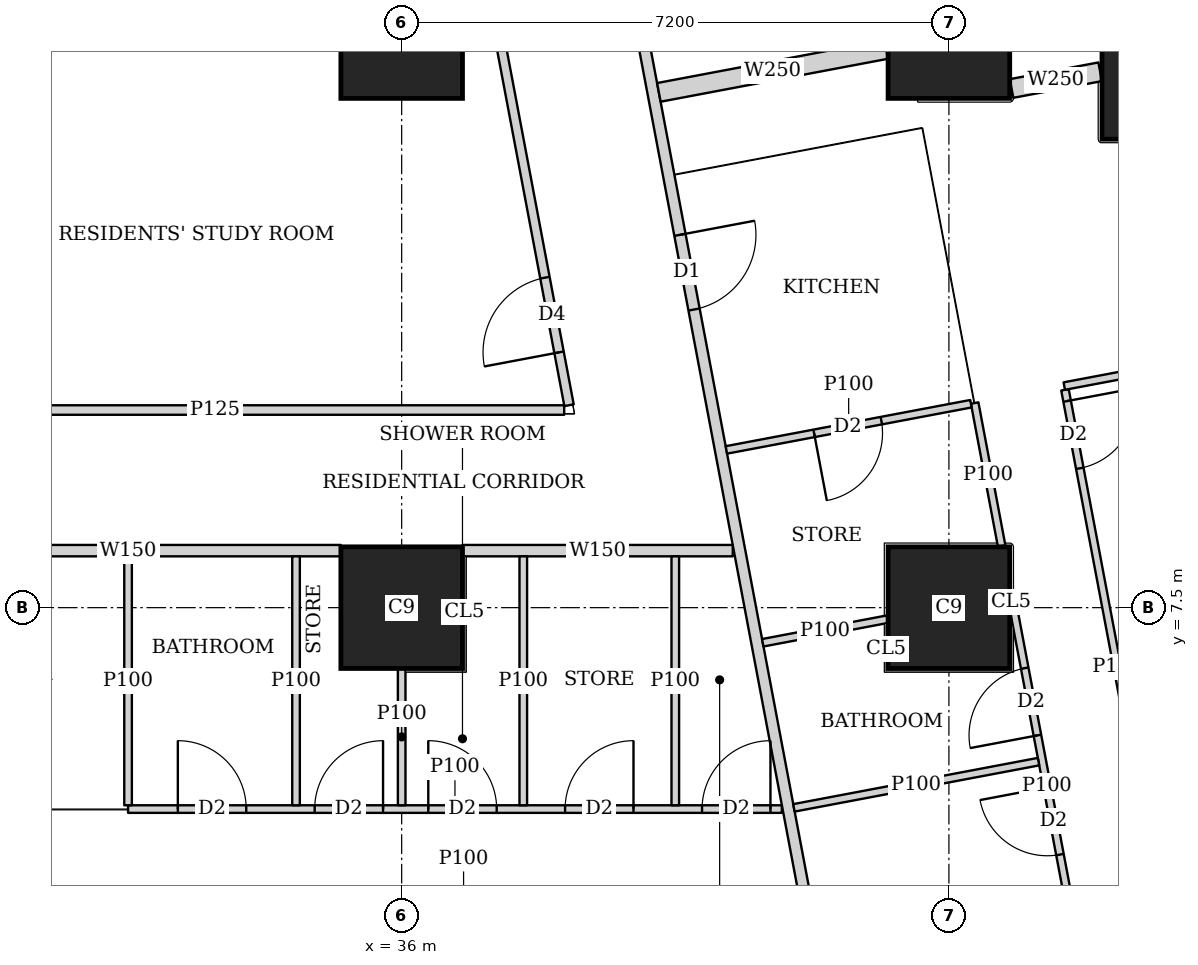
"""IFC4 building model, lengths in metres.
Left out: names, types, materials, properties, quantities, classifications, styles, units other than length and angle.
Written with IfcOpenShell. Run it as: python <this file> out.ifc"""

import sys

from ifc_helpers import new_model, si_unit, direction, frame, frame_2d, origin, origin_2d, place, context, subcontext, project, spatial, rectangle, extrude, element, fill, save


model = new_model("IFC4")
c1 = context("Model", 3, precision=1e-05, world=origin(), true_north=direction((0.0, 1.0)))
c2 = subcontext(c1, "Body", "Model", "MODEL_VIEW")
j1 = project(units=[si_unit("LENGTHUNIT", "METRE"), si_unit("PLANEANGLEUNIT", "RADIAN")], contexts=[c1])
p1 = place(None, origin())
s1 = spatial("IfcSite", under=j1, at=p1, CompositionType="ELEMENT")
p2 = place(p1, origin())
s2 = spatial("IfcBuilding", under=s1, at=p2, CompositionType="ELEMENT")
p3 = place(p2, frame((0.0, 0.0, 81.65)))
s3 = spatial("IfcBuildingStorey", under=s2, at=p3, CompositionType="ELEMENT", Elevation=81.65)
for number, where, z_axis, x_axis in (
    (1, (36.0, 7.5, 0.0), (0.0, 0.0, 1.0), (1.0, 0.0, 0.0)),
    (2, (43.2, 7.5, 0.0), (0.0, 0.0, 1.0), (1.0, 0.0, 0.0)),
    (3, (36.0, 15.0, 0.0), (0.0, 0.0, 1.0), (1.0, 0.0, 0.0)),
    (4, (43.2, 15.0, 0.0), (0.0, 0.0, 1.0), (1.0, 0.0, 0.0)),
):
    element("IfcColumn", number, at=place(p3, frame(where, z_axis=z_axis, x_axis=x_axis)), inside=s3, PredefinedType="COLUMN", context=c2, shape_type="SweptSolid", body=[
        extrude(rectangle(XDim=1.6, YDim=1.6, at=origin_2d()), origin(), (0.0, 0.0, 1.0), 3.75),
    ])
p4 = place(p3, frame((46.314, 14.763, 0.0), z_axis=(0.0, 0.0, 1.0), x_axis=(1.0, 0.0, 0.0)))
e5 = element("IfcColumn", 5, at=p4, inside=s3, PredefinedType="COLUMN", context=c2, shape_type="SweptSolid", body=[
    extrude(rectangle(XDim=2.2, YDim=2.2, at=origin_2d()), origin(), (0.0, 0.0, 1.0), 3.75),
])
p5 = place(p3, frame((50.653, 2.703, 0.0), z_axis=(0.0, 0.0, 1.0), x_axis=(-0.185612026696, 0.982623109613, 0.0)))
e6 = element("IfcWall", 6, at=p5, inside=s3, PredefinedType="SOLIDWALL", context=c2, shape_type="SweptSolid", body=[
    extrude(rectangle(XDim=41.393, YDim=0.2, at=frame_2d((20.697, 0.0))), origin(), (0.0, 0.0, 1.0), 3.5),
])
p6 = place(p5, frame((1.633, 0.0, 0.9)))
e7 = element("IfcOpeningElement", 7, at=p6, cuts=e6, PredefinedType="OPENING", context=c2, shape_type="SweptSolid", body=[
    extrude(rectangle(XDim=1.8, YDim=1.5, at=frame_2d((0.9, 0.75))), frame((0.0, 0.11, 0.0), z_axis=(0.0, -1.0, 0.0), x_axis=(1.0, 0.0, 0.0)), (0.0, 0.0, 1.0), 0.22),
])
p7 = place(p5, frame((6.032, 0.0, 0.9)))
e8 = element("IfcOpeningElement", 8, at=p7, cuts=e6, PredefinedType="OPENING", context=c2, shape_type="SweptSolid", body=[
    extrude(rectangle(XDim=1.8, YDim=1.5, at=frame_2d((0.9, 0.75))), frame((0.0, 0.11, 0.0), z_axis=(0.0, -1.0, 0.0), x_axis=(1.0, 0.0, 0.0)), (0.0, 0.0, 1.0), 0.22),
])
p8 = place(p5, frame((9.848, 0.0, 0.9)))
e9 = element("IfcOpeningElement", 9, at=p8, cuts=e6, PredefinedType="OPENING", context=c2, shape_type="SweptSolid", body=[
    extrude(rectangle(XDim=1.8, YDim=1.5, at=frame_2d((0.9, 0.75))), frame((0.0, 0.11, 0.0), z_axis=(0.0, -1.0, 0.0), x_axis=(1.0, 0.0, 0.0)), (0.0, 0.0, 1.0), 0.22),
])
p9 = place(p5, frame((13.664, 0.0, 0.9)))
e10 = element("IfcOpeningElement", 10, at=p9, cuts=e6, PredefinedType="OPENING", context=c2, shape_type="SweptSolid", body=[
    extrude(rectangle(XDim=1.8, YDim=1.5, at=frame_2d((0.9, 0.75))), frame((0.0, 0.11, 0.0), z_axis=(0.0, -1.0, 0.0), x_axis=(1.0, 0.0, 0.0)), (0.0, 0.0, 1.0), 0.22),
])
p10 = place(p5, frame((17.481, 0.0, 0.9)))
e11 = element("IfcOpeningElement", 11, at=p10, cuts=e6, PredefinedType="OPENING", context=c2, shape_type="SweptSolid", body=[
    extrude(rectangle(XDim=1.8, YDim=1.5, at=frame_2d((0.9, 0.75))), frame((0.0, 0.11, 0.0), z_axis=(0.0, -1.0, 0.0), x_axis=(1.0, 0.0, 0.0)), (0.0, 0.0, 1.0), 0.22),
])
p11 = place(p5, frame((21.297, 0.0, 0.9)))
e12 = element("IfcOpeningElement", 12, at=p11, cuts=e6, PredefinedType="OPENING", context=c2, shape_type="SweptSolid", body=[
    extrude(rectangle(XDim=1.8, YDim=1.5, at=frame_2d((0.9, 0.75))), frame((0.0, 0.11, 0.0), z_axis=(0.0, -1.0, 0.0), x_axis=(1.0, 0.0, 0.0)), (0.0, 0.0, 1.0), 0.22),
])
p12 = place(p5, frame((25.113, 0.0, 0.9)))
e13 = element("IfcOpeningElement", 13, at=p12, cuts=e6, PredefinedType="OPENING", context=c2, shape_type="SweptSolid", body=[
    extrude(rectangle(XDim=1.8, YDim=1.5, at=frame_2d((0.9, 0.75))), frame((0.0, 0.11, 0.0), z_axis=(0.0, -1.0, 0.0), x_axis=(1.0, 0.0, 0.0)), (0.0, 0.0, 1.0), 0.22),
])
p13 = place(p5, frame((28.93, 0.0, 0.9)))
e14 = element("IfcOpeningElement", 14, at=p13, cuts=e6, PredefinedType="OPENING", context=c2, shape_type="SweptSolid", body=[
    extrude(rectangle(XDim=1.8, YDim=1.5, at=frame_2d((0.9, 0.75))), frame((0.0, 0.11, 0.0), z_axis=(0.0, -1.0, 0.0), x_axis=(1.0, 0.0, 0.0)), (0.0, 0.0, 1.0), 0.22),
])
p14 = place(p5, frame((32.746, 0.0, 0.9)))
e15 = element("IfcOpeningElement", 15, at=p14, cuts=e6, PredefinedType="OPENING", context=c2, shape_type="SweptSolid", body=[
    extrude(rectangle(XDim=1.8, YDim=1.5, at=frame_2d((0.9, 0.75))), frame((0.0, 0.11, 0.0), z_axis=(0.0, -1.0, 0.0), x_axis=(1.0, 0.0, 0.0)), (0.0, 0.0, 1.0), 0.22),
])
p15 = place(p5, frame((36.481, 0.0, 0.9)))
e16 = element("IfcOpeningElement", 16, at=p15, cuts=e6, PredefinedType="OPENING", context=c2, shape_type="SweptSolid", body=[
    extrude(rectangle(XDim=1.8, YDim=1.5, at=frame_2d((0.9, 0.75))), frame((0.0, 0.11, 0.0), z_axis=(0.0, -1.0, 0.0), x_axis=(1.0, 0.0, 0.0)), (0.0, 0.0, 1.0), 0.22),
])
p16 = place(p3, frame((40.356, 8.25, 0.0), z_axis=(0.0, 0.0, 1.0), x_axis=(-1.0, 0.0, 0.0)))
e17 = element("IfcWall", 17, at=p16, inside=s3, PredefinedType="SOLIDWALL", context=c2, shape_type="SweptSolid", body=[
    extrude(rectangle(XDim=3.555, YDim=0.15, at=frame_2d((1.777, 0.0))), origin(), (0.0, 0.0, 1.0), 3.5),
])
p17 = place(p3, frame((35.199, 8.25, 0.0), z_axis=(0.0, 0.0, 1.0), x_axis=(-1.0, 0.0, 0.0)))
e18 = element("IfcWall", 18, at=p17, inside=s3, PredefinedType="SOLIDWALL", context=c2, shape_type="SweptSolid", body=[
    extrude(rectangle(XDim=5.598, YDim=0.15, at=frame_2d((2.799, 0.0))), origin(), (0.0, 0.0, 1.0), 3.5),
])
p18 = place(p17, frame((3.899, 0.0, 0.0)))
e19 = element("IfcOpeningElement", 19, at=p18, cuts=e18, PredefinedType="OPENING", context=c2, shape_type="SweptSolid", body=[
    extrude(rectangle(XDim=1.0, YDim=2.1, at=frame_2d((0.5, 1.05))), frame((0.0, 0.085, 0.0), z_axis=(0.0, -1.0, 0.0), x_axis=(1.0, 0.0, 0.0)), (0.0, 0.0, 1.0), 0.17),
])
p19 = place(p3, frame((33.382, 45.65, 0.0), z_axis=(0.0, 0.0, 1.0), x_axis=(0.185593544777, -0.982626600565, 0.0)))
e20 = element("IfcWall", 20, at=p19, inside=s3, PredefinedType="SOLIDWALL", context=c2, shape_type="SweptSolid", body=[
    extrude(rectangle(XDim=47.118, YDim=0.15, at=frame_2d((23.559, 0.0))), origin(), (0.0, 0.0, 1.0), 2.2),
])
p20 = place(p19, frame((19.054, 0.0, 0.0)))
e21 = element("IfcOpeningElement", 21, at=p20, cuts=e20, PredefinedType="OPENING", context=c2, shape_type="SweptSolid", body=[
    extrude(rectangle(XDim=1.0, YDim=2.1, at=frame_2d((0.5, 1.05))), frame((0.0, 0.085, 0.0), z_axis=(0.0, -1.0, 0.0), x_axis=(1.0, 0.0, 0.0)), (0.0, 0.0, 1.0), 0.17),
])
p21 = place(p19, frame((22.87, 0.0, 0.0)))
e22 = element("IfcOpeningElement", 22, at=p21, cuts=e20, PredefinedType="OPENING", context=c2, shape_type="SweptSolid", body=[
    extrude(rectangle(XDim=1.0, YDim=2.1, at=frame_2d((0.5, 1.05))), frame((0.0, 0.085, 0.0), z_axis=(0.0, -1.0, 0.0), x_axis=(1.0, 0.0, 0.0)), (0.0, 0.0, 1.0), 0.17),
])
p22 = place(p19, frame((33.833, 0.0, 0.0)))
e23 = element("IfcOpeningElement", 23, at=p22, cuts=e20, PredefinedType="OPENING", context=c2, shape_type="SweptSolid", body=[
    extrude(rectangle(XDim=1.0, YDim=2.1, at=frame_2d((0.5, 1.05))), frame((0.0, 0.085, 0.0), z_axis=(0.0, -1.0, 0.0), x_axis=(1.0, 0.0, 0.0)), (0.0, 0.0, 1.0), 0.17),
])
p23 = place(p3, frame((41.002, 4.85, 0.0), z_axis=(0.0, 0.0, 1.0), x_axis=(-1.0, 0.0, 0.0)))
e24 = element("IfcWall", 24, at=p23, inside=s3, PredefinedType="PARTITIONING", context=c2, shape_type="SweptSolid", body=[
    extrude(rectangle(XDim=8.602, YDim=0.1, at=frame_2d((4.301, 0.0))), origin(), (0.0, 0.0, 1.0), 3.5),
])
p24 = place(p23, frame((7.047, 0.0, 0.0)))
e25 = element("IfcOpeningElement", 25, at=p24, cuts=e24, PredefinedType="OPENING", context=c2, shape_type="SweptSolid", body=[
    extrude(rectangle(XDim=0.9, YDim=2.1, at=frame_2d((0.45, 1.05))), frame((0.0, 0.06, 0.0), z_axis=(0.0, -1.0, 0.0), x_axis=(1.0, 0.0, 0.0)), (0.0, 0.0, 1.0), 0.12),
])
p25 = place(p23, frame((3.752, 0.0, 0.0)))
e26 = element("IfcOpeningElement", 26, at=p25, cuts=e24, PredefinedType="OPENING", context=c2, shape_type="SweptSolid", body=[
    extrude(rectangle(XDim=0.9, YDim=2.1, at=frame_2d((0.45, 1.05))), frame((0.0, 0.06, 0.0), z_axis=(0.0, -1.0, 0.0), x_axis=(1.0, 0.0, 0.0)), (0.0, 0.0, 1.0), 0.12),
])
p26 = place(p23, frame((0.15, 0.0, 0.0)))
e27 = element("IfcOpeningElement", 27, at=p26, cuts=e24, PredefinedType="OPENING", context=c2, shape_type="SweptSolid", body=[
    extrude(rectangle(XDim=0.9, YDim=2.1, at=frame_2d((0.45, 1.05))), frame((0.0, 0.06, 0.0), z_axis=(0.0, -1.0, 0.0), x_axis=(1.0, 0.0, 0.0)), (0.0, 0.0, 1.0), 0.12),
])
p27 = place(p23, frame((5.247, 0.0, 0.0)))
e28 = element("IfcOpeningElement", 28, at=p27, cuts=e24, PredefinedType="OPENING", context=c2, shape_type="SweptSolid", body=[
    extrude(rectangle(XDim=0.9, YDim=2.1, at=frame_2d((0.45, 1.05))), frame((0.0, 0.06, 0.0), z_axis=(0.0, -1.0, 0.0), x_axis=(1.0, 0.0, 0.0)), (0.0, 0.0, 1.0), 0.12),
])
p28 = place(p23, frame((1.952, 0.0, 0.0)))
e29 = element("IfcOpeningElement", 29, at=p28, cuts=e24, PredefinedType="OPENING", context=c2, shape_type="SweptSolid", body=[
    extrude(rectangle(XDim=0.9, YDim=2.1, at=frame_2d((0.45, 1.05))), frame((0.0, 0.06, 0.0), z_axis=(0.0, -1.0, 0.0), x_axis=(1.0, 0.0, 0.0)), (0.0, 0.0, 1.0), 0.12),
])
p29 = place(p3, frame((32.4, 4.9, 0.0), z_axis=(0.0, 0.0, 1.0), x_axis=(0.0, 1.0, 0.0)))
e30 = element("IfcWall", 30, at=p29, inside=s3, PredefinedType="PARTITIONING", context=c2, shape_type="SweptSolid", body=[
    extrude(rectangle(XDim=3.275, YDim=0.1, at=frame_2d((1.638, 0.0))), origin(), (0.0, 0.0, 1.0), 3.5),
])
p30 = place(p3, frame((36.0, 4.9, 0.0), z_axis=(0.0, 0.0, 1.0), x_axis=(0.0, 1.0, 0.0)))
e31 = element("IfcWall", 31, at=p30, inside=s3, PredefinedType="PARTITIONING", context=c2, shape_type="SweptSolid", body=[
    extrude(rectangle(XDim=1.799, YDim=0.1, at=frame_2d((0.899, 0.0))), origin(), (0.0, 0.0, 1.0), 3.5),
])
for number, where, z_axis, x_axis in (
    (32, (39.6, 4.9, 0.0), (0.0, 0.0, 1.0), (0.0, 1.0, 0.0)),
    (33, (34.61, 4.9, 0.0), (0.0, 0.0, 1.0), (0.0, 1.0, 0.0)),
    (34, (37.6, 4.9, 0.0), (0.0, 0.0, 1.0), (0.0, 1.0, 0.0)),
):
    element("IfcWall", number, at=place(p3, frame(where, z_axis=z_axis, x_axis=x_axis)), inside=s3, PredefinedType="PARTITIONING", context=c2, shape_type="SweptSolid", body=[
        extrude(rectangle(XDim=3.275, YDim=0.1, at=frame_2d((1.638, 0.0))), origin(), (0.0, 0.0, 1.0), 3.5),
    ])
p31 = place(p3, frame((44.727, 10.366, 0.0), z_axis=(0.0, 0.0, 1.0), x_axis=(0.185678775129, -0.982610498858, 0.0)))
e35 = element("IfcWall", 35, at=p31, inside=s3, PredefinedType="PARTITIONING", context=c2, shape_type="SweptSolid", body=[
    extrude(rectangle(XDim=7.421, YDim=0.1, at=frame_2d((3.71, 0.0))), origin(), (0.0, 0.0, 1.0), 3.5),
])
p32 = place(p31, frame((0.151, 0.0, 0.0)))
e36 = element("IfcOpeningElement", 36, at=p32, cuts=e35, PredefinedType="OPENING", context=c2, shape_type="SweptSolid", body=[
    extrude(rectangle(XDim=0.9, YDim=2.1, at=frame_2d((0.45, 1.05))), frame((0.0, 0.06, 0.0), z_axis=(0.0, -1.0, 0.0), x_axis=(1.0, 0.0, 0.0)), (0.0, 0.0, 1.0), 0.12),
])
p33 = place(p31, frame((4.55, 0.0, 0.0)))
e37 = element("IfcOpeningElement", 37, at=p33, cuts=e35, PredefinedType="OPENING", context=c2, shape_type="SweptSolid", body=[
    extrude(rectangle(XDim=0.9, YDim=2.1, at=frame_2d((0.45, 1.05))), frame((0.0, 0.06, 0.0), z_axis=(0.0, -1.0, 0.0), x_axis=(1.0, 0.0, 0.0)), (0.0, 0.0, 1.0), 0.12),
])
p34 = place(p3, frame((43.539, 10.192, 0.0), z_axis=(0.0, 0.0, 1.0), x_axis=(0.185366049966, -0.982669541362, 0.0)))
e38 = element("IfcWall", 38, at=p34, inside=s3, PredefinedType="PARTITIONING", context=c2, shape_type="SweptSolid", body=[
    extrude(rectangle(XDim=1.915, YDim=0.1, at=frame_2d((0.958, 0.0))), origin(), (0.0, 0.0, 1.0), 3.5),
])
p35 = place(p3, frame((44.049, 7.49, 0.0), z_axis=(0.0, 0.0, 1.0), x_axis=(0.185666332607, -0.982612849975, 0.0)))
e39 = element("IfcWall", 39, at=p35, inside=s3, PredefinedType="PARTITIONING", context=c2, shape_type="SweptSolid", body=[
    extrude(rectangle(XDim=4.75, YDim=0.1, at=frame_2d((2.375, 0.0))), origin(), (0.0, 0.0, 1.0), 3.5),
])
p36 = place(p35, frame((0.8, 0.0, 0.0)))
e40 = element("IfcOpeningElement", 40, at=p36, cuts=e39, PredefinedType="OPENING", context=c2, shape_type="SweptSolid", body=[
    extrude(rectangle(XDim=0.9, YDim=2.1, at=frame_2d((0.45, 1.05))), frame((0.0, 0.06, 0.0), z_axis=(0.0, -1.0, 0.0), x_axis=(1.0, 0.0, 0.0)), (0.0, 0.0, 1.0), 0.12),
])
p37 = place(p35, frame((2.396, 0.0, 0.0)))
e41 = element("IfcOpeningElement", 41, at=p37, cuts=e39, PredefinedType="OPENING", context=c2, shape_type="SweptSolid", body=[
    extrude(rectangle(XDim=0.9, YDim=2.1, at=frame_2d((0.45, 1.05))), frame((0.0, 0.06, 0.0), z_axis=(0.0, -1.0, 0.0), x_axis=(1.0, 0.0, 0.0)), (0.0, 0.0, 1.0), 0.12),
])
p38 = place(p3, frame((48.943, 11.213, 0.0), z_axis=(0.0, 0.0, 1.0), x_axis=(-0.982633535512, -0.185556823879, 0.0)))
e42 = element("IfcWall", 42, at=p38, inside=s3, PredefinedType="PARTITIONING", context=c2, shape_type="SweptSolid", body=[
    extrude(rectangle(XDim=4.3, YDim=0.1, at=frame_2d((2.15, 0.0))), origin(), (0.0, 0.0, 1.0), 2.2),
])
p39 = place(p3, frame((43.49, 10.183, 0.0), z_axis=(0.0, 0.0, 1.0), x_axis=(-0.982607026909, -0.185697147715, 0.0)))
e43 = element("IfcWall", 43, at=p39, inside=s3, PredefinedType="PARTITIONING", context=c2, shape_type="SweptSolid", body=[
    extrude(rectangle(XDim=3.275, YDim=0.1, at=frame_2d((1.637, 0.0))), origin(), (0.0, 0.0, 1.0), 3.5),
])
p40 = place(p39, frame((1.2, 0.0, 0.0)))
e44 = element("IfcOpeningElement", 44, at=p40, cuts=e43, PredefinedType="OPENING", context=c2, shape_type="SweptSolid", body=[
    extrude(rectangle(XDim=0.9, YDim=2.1, at=frame_2d((0.45, 1.05))), frame((0.0, 0.06, 0.0), z_axis=(0.0, -1.0, 0.0), x_axis=(1.0, 0.0, 0.0)), (0.0, 0.0, 1.0), 0.12),
])
p41 = place(p3, frame((42.39, 7.348, 0.0), z_axis=(0.0, 0.0, 1.0), x_axis=(-0.9825976927, -0.185746532405, 0.0)))
e45 = element("IfcWall", 45, at=p41, inside=s3, PredefinedType="PARTITIONING", context=c2, shape_type="SweptSolid", body=[
    extrude(rectangle(XDim=1.668, YDim=0.1, at=frame_2d((0.834, 0.0))), origin(), (0.0, 0.0, 1.0), 3.5),
])
p42 = place(p3, frame((44.379, 5.474, 0.0), z_axis=(0.0, 0.0, 1.0), x_axis=(-0.982607026909, -0.185697147715, 0.0)))
e46 = element("IfcWall", 46, at=p42, inside=s3, PredefinedType="PARTITIONING", context=c2, shape_type="SweptSolid", body=[
    extrude(rectangle(XDim=3.275, YDim=0.1, at=frame_2d((1.637, 0.0))), origin(), (0.0, 0.0, 1.0), 3.5),
])
p43 = place(p3, frame((45.19, 14.55, 0.0), z_axis=(0.0, 0.0, 1.0), x_axis=(-0.982666604435, -0.185381618634, 0.0)))
e47 = element("IfcWall", 47, at=p43, inside=s3, PredefinedType="SOLIDWALL", context=c2, shape_type="SweptSolid", body=[
    extrude(rectangle(XDim=1.187, YDim=0.25, at=frame_2d((0.593, 0.0))), origin(), (0.0, 0.0, 1.0), 3.5),
])
p44 = place(p3, frame((42.376, 14.844, 0.0), z_axis=(0.0, 0.0, 1.0), x_axis=(-0.982636286056, -0.185542257522, 0.0)))
e48 = element("IfcWall", 48, at=p44, inside=s3, PredefinedType="SOLIDWALL", context=c2, shape_type="SweptSolid", body=[
    extrude(rectangle(XDim=3.045, YDim=0.25, at=frame_2d((1.522, 0.0))), origin(), (0.0, 0.0, 1.0), 3.5),
])
p45 = place(p3, frame((28.95, 10.1, 0.0), z_axis=(0.0, 0.0, 1.0), x_axis=(1.0, 0.0, 0.0)))
e49 = element("IfcWall", 49, at=p45, inside=s3, PredefinedType="PARTITIONING", context=c2, shape_type="SweptSolid", body=[
    extrude(rectangle(XDim=9.188, YDim=0.125, at=frame_2d((4.594, 0.0))), origin(), (0.0, 0.0, 1.0), 3.5),
])
p46 = place(p3, frame((38.202, 10.163, 0.0), z_axis=(0.0, 0.0, 1.0), x_axis=(-0.185645577403, 0.982616771479, 0.0)))
e50 = element("IfcWall", 50, at=p46, inside=s3, PredefinedType="PARTITIONING", context=c2, shape_type="SweptSolid", body=[
    extrude(rectangle(XDim=12.555, YDim=0.125, at=frame_2d((6.278, 0.0))), origin(), (0.0, 0.0, 1.0), 2.5),
])
p47 = place(p46, frame((0.708, 0.0, 0.0)))
e51 = element("IfcOpeningElement", 51, at=p47, cuts=e50, PredefinedType="OPENING", context=c2, shape_type="SweptSolid", body=[
    extrude(rectangle(XDim=1.0, YDim=2.1, at=frame_2d((0.5, 1.05))), frame((0.0, 0.073, 0.0), z_axis=(0.0, -1.0, 0.0), x_axis=(1.0, 0.0, 0.0)), (0.0, 0.0, 1.0), 0.145),
])
p48 = place(p46, frame((6.0, 0.0, 0.0)))
e52 = element("IfcOpeningElement", 52, at=p48, cuts=e50, PredefinedType="OPENING", context=c2, shape_type="SweptSolid", body=[
    extrude(rectangle(XDim=1.0, YDim=2.1, at=frame_2d((0.5, 1.05))), frame((0.0, 0.073, 0.0), z_axis=(0.0, -1.0, 0.0), x_axis=(1.0, 0.0, 0.0)), (0.0, 0.0, 1.0), 0.145),
])
p49 = place(p46, frame((9.562, 0.0, 0.0)))
e53 = element("IfcOpeningElement", 53, at=p49, cuts=e50, PredefinedType="OPENING", context=c2, shape_type="SweptSolid", body=[
    extrude(rectangle(XDim=1.0, YDim=2.1, at=frame_2d((0.5, 1.05))), frame((0.0, 0.073, 0.0), z_axis=(0.0, -1.0, 0.0), x_axis=(1.0, 0.0, 0.0)), (0.0, 0.0, 1.0), 0.145),
])
p50 = place(p24, origin())
e54 = element("IfcDoor", 54, at=p50, inside=s3, OperationType="SINGLE_SWING_LEFT", PredefinedType="DOOR", context=c2, shape_type="SweptSolid", body=[
    extrude(rectangle(XDim=0.9, YDim=2.1, at=frame_2d((0.45, 1.05))), frame((0.0, 0.025, 0.0), z_axis=(0.0, -1.0, 0.0), x_axis=(1.0, 0.0, 0.0)), (0.0, 0.0, 1.0), 0.05),
])
fill(e25, e54)
p51 = place(p25, origin())
e55 = element("IfcDoor", 55, at=p51, inside=s3, OperationType="SINGLE_SWING_LEFT", PredefinedType="DOOR", context=c2, shape_type="SweptSolid", body=[
    extrude(rectangle(XDim=0.9, YDim=2.1, at=frame_2d((0.45, 1.05))), frame((0.0, 0.025, 0.0), z_axis=(0.0, -1.0, 0.0), x_axis=(1.0, 0.0, 0.0)), (0.0, 0.0, 1.0), 0.05),
])
fill(e26, e55)
p52 = place(p26, origin())
e56 = element("IfcDoor", 56, at=p52, inside=s3, OperationType="SINGLE_SWING_RIGHT", PredefinedType="DOOR", context=c2, shape_type="SweptSolid", body=[
    extrude(rectangle(XDim=0.9, YDim=2.1, at=frame_2d((0.45, 1.05))), frame((0.0, 0.025, 0.0), z_axis=(0.0, -1.0, 0.0), x_axis=(1.0, 0.0, 0.0)), (0.0, 0.0, 1.0), 0.05),
])
fill(e27, e56)
p53 = place(p27, origin())
e57 = element("IfcDoor", 57, at=p53, inside=s3, OperationType="SINGLE_SWING_RIGHT", PredefinedType="DOOR", context=c2, shape_type="SweptSolid", body=[
    extrude(rectangle(XDim=0.9, YDim=2.1, at=frame_2d((0.45, 1.05))), frame((0.0, 0.025, 0.0), z_axis=(0.0, -1.0, 0.0), x_axis=(1.0, 0.0, 0.0)), (0.0, 0.0, 1.0), 0.05),
])
fill(e28, e57)
p54 = place(p28, origin())
e58 = element("IfcDoor", 58, at=p54, inside=s3, OperationType="SINGLE_SWING_RIGHT", PredefinedType="DOOR", context=c2, shape_type="SweptSolid", body=[
    extrude(rectangle(XDim=0.9, YDim=2.1, at=frame_2d((0.45, 1.05))), frame((0.0, 0.025, 0.0), z_axis=(0.0, -1.0, 0.0), x_axis=(1.0, 0.0, 0.0)), (0.0, 0.0, 1.0), 0.05),
])
fill(e29, e58)
p55 = place(p32, origin())
e59 = element("IfcDoor", 59, at=p55, inside=s3, OperationType="SINGLE_SWING_LEFT", PredefinedType="DOOR", context=c2, shape_type="SweptSolid", body=[
    extrude(rectangle(XDim=0.9, YDim=2.1, at=frame_2d((0.45, 1.05))), frame((0.0, 0.025, 0.0), z_axis=(0.0, -1.0, 0.0), x_axis=(1.0, 0.0, 0.0)), (0.0, 0.0, 1.0), 0.05),
])
fill(e36, e59)
p56 = place(p36, origin())
e60 = element("IfcDoor", 60, at=p56, inside=s3, OperationType="SINGLE_SWING_LEFT", PredefinedType="DOOR", context=c2, shape_type="SweptSolid", body=[
    extrude(rectangle(XDim=0.9, YDim=2.1, at=frame_2d((0.45, 1.05))), frame((0.0, 0.025, 0.0), z_axis=(0.0, -1.0, 0.0), x_axis=(1.0, 0.0, 0.0)), (0.0, 0.0, 1.0), 0.05),
])
fill(e40, e60)
p57 = place(p37, origin())
e61 = element("IfcDoor", 61, at=p57, inside=s3, OperationType="SINGLE_SWING_RIGHT", PredefinedType="DOOR", context=c2, shape_type="SweptSolid", body=[
    extrude(rectangle(XDim=0.9, YDim=2.1, at=frame_2d((0.45, 1.05))), frame((0.0, 0.025, 0.0), z_axis=(0.0, -1.0, 0.0), x_axis=(1.0, 0.0, 0.0)), (0.0, 0.0, 1.0), 0.05),
])
fill(e41, e61)
p58 = place(p22, origin())
e62 = element("IfcDoor", 62, at=p58, inside=s3, OperationType="SINGLE_SWING_LEFT", PredefinedType="DOOR", context=c2, shape_type="SweptSolid", body=[
    extrude(rectangle(XDim=1.0, YDim=2.1, at=frame_2d((0.5, 1.05))), frame((0.0, 0.025, 0.0), z_axis=(0.0, -1.0, 0.0), x_axis=(1.0, 0.0, 0.0)), (0.0, 0.0, 1.0), 0.05),
])
fill(e23, e62)
p59 = place(p40, origin())
e63 = element("IfcDoor", 63, at=p59, inside=s3, OperationType="SINGLE_SWING_RIGHT", PredefinedType="DOOR", context=c2, shape_type="SweptSolid", body=[
    extrude(rectangle(XDim=0.9, YDim=2.1, at=frame_2d((0.45, 1.05))), frame((0.0, 0.025, 0.0), z_axis=(0.0, -1.0, 0.0), x_axis=(1.0, 0.0, 0.0)), (0.0, 0.0, 1.0), 0.05),
])
fill(e44, e63)
p60 = place(p47, origin())
e64 = element("IfcDoor", 64, at=p60, inside=s3, OperationType="SINGLE_SWING_LEFT", PredefinedType="DOOR", context=c2, shape_type="SweptSolid", body=[
    extrude(rectangle(XDim=1.0, YDim=2.1, at=frame_2d((0.5, 1.05))), frame((0.0, 0.025, 0.0), z_axis=(0.0, -1.0, 0.0), x_axis=(1.0, 0.0, 0.0)), (0.0, 0.0, 1.0), 0.05),
])
fill(e51, e64)
save(model, sys.argv[1])
